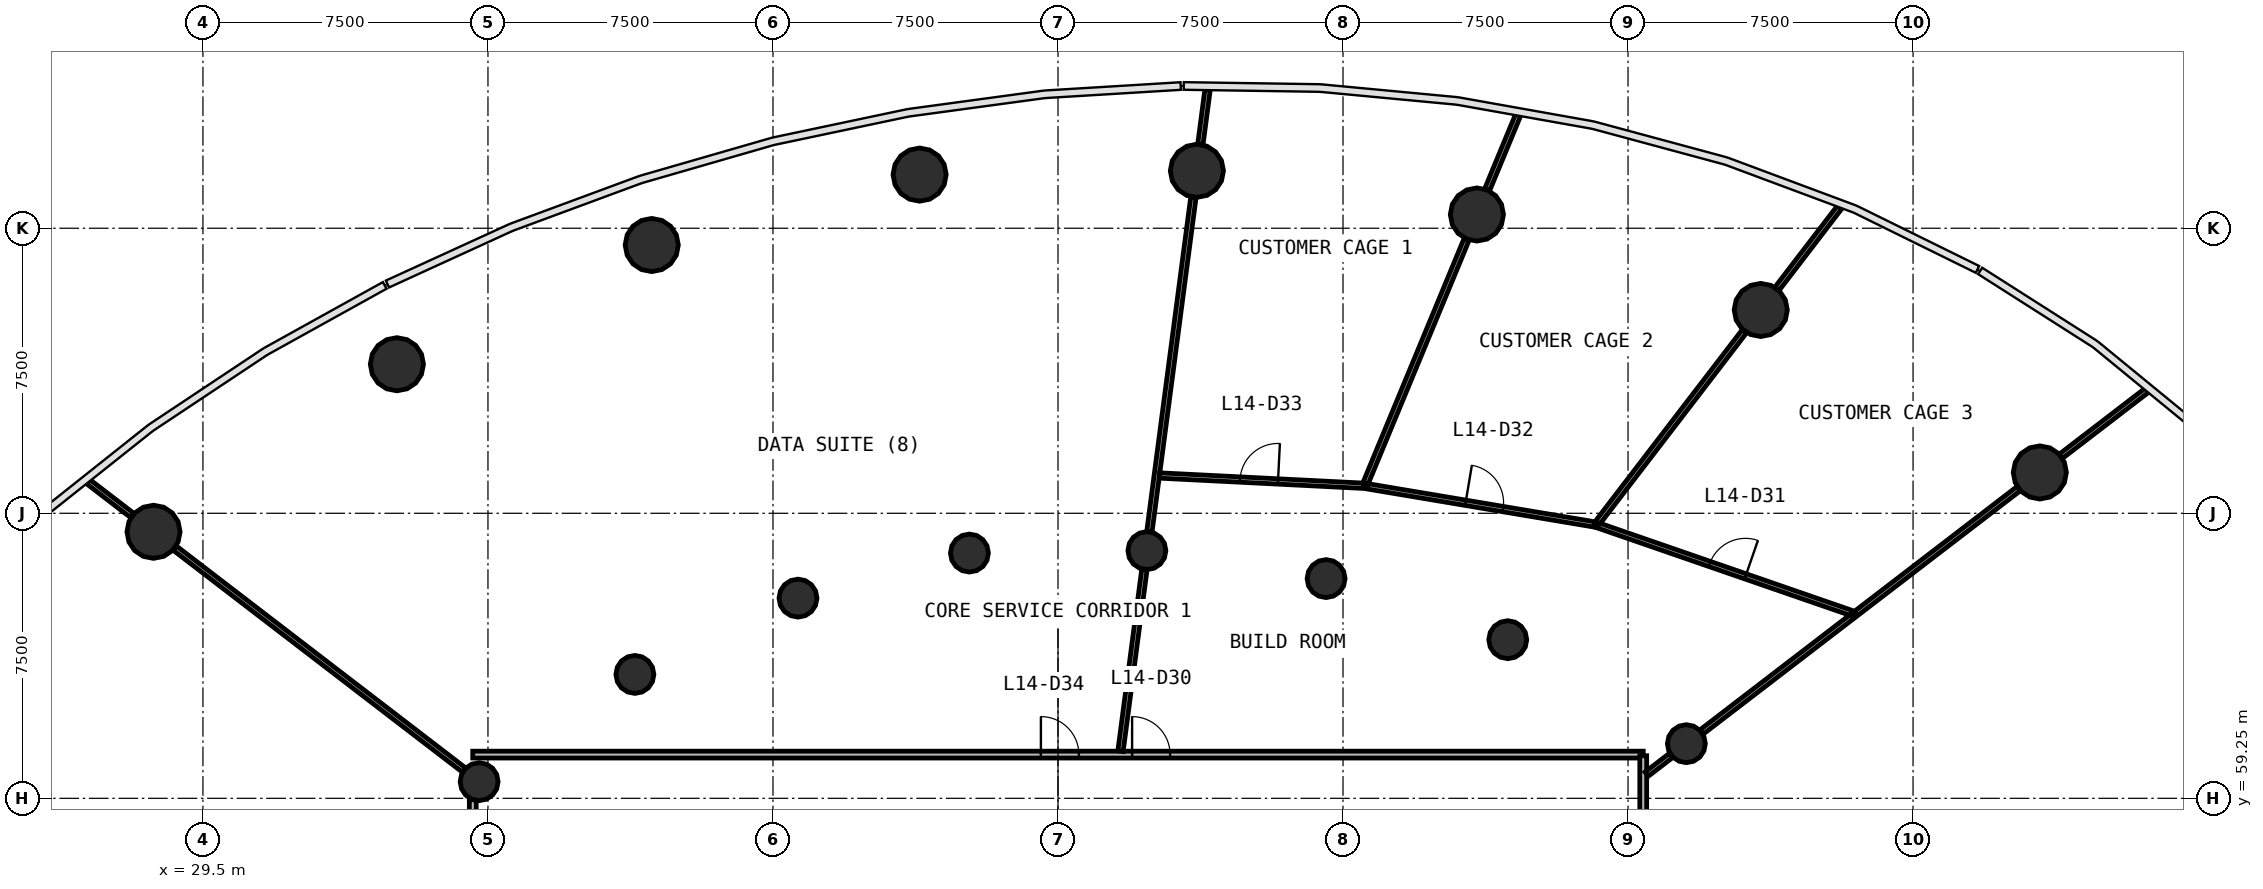
"""IFC4 building model, lengths in metres.
Left out: names, types, materials, properties, quantities, classifications, styles, units other than length and angle.
Written with IfcOpenShell. Run it as: python <this file> out.ifc"""

import sys

from ifc_helpers import new_model, si_unit, direction, frame, frame_2d, origin, origin_2d, place, context, subcontext, project, spatial, rectangle, circle, extrude, source, transform, mapped, element, fill, save


model = new_model("IFC4")
c1 = context("Model", 3, precision=1e-05, world=origin(), true_north=direction((0.0, 1.0)))
c2 = subcontext(c1, "Body", "Model", "MODEL_VIEW")
j1 = project(units=[si_unit("LENGTHUNIT", "METRE"), si_unit("PLANEANGLEUNIT", "RADIAN")], contexts=[c1])
p1 = place(None, origin())
s1 = spatial("IfcSite", under=j1, at=p1, CompositionType="ELEMENT")
p2 = place(p1, origin())
s2 = spatial("IfcBuilding", under=s1, at=p2, CompositionType="ELEMENT")
p3 = place(p2, frame((0.0, 0.0, 62.2)))
s3 = spatial("IfcBuildingStorey", under=s2, at=p3, CompositionType="ELEMENT", Elevation=62.2)
m1 = source(origin(), c2, "Body", "SweptSolid", [
    extrude(circle(Radius=0.7, at=origin_2d()), origin(), (0.0, 0.0, 1.0), 4.4),
])
for number, where, z_axis, x_axis in (
    (1, (77.836, 67.824, 0.0), (0.0, 0.0, 1.0), (1.0, 0.0, 0.0)),
    (2, (70.492, 72.1, 0.0), (0.0, 0.0, 1.0), (1.0, 0.0, 0.0)),
    (3, (63.023, 74.611, 0.0), (0.0, 0.0, 1.0), (1.0, 0.0, 0.0)),
    (4, (55.655, 75.761, 0.0), (0.0, 0.0, 1.0), (1.0, 0.0, 0.0)),
    (5, (48.358, 75.661, 0.0), (0.0, 0.0, 1.0), (1.0, 0.0, 0.0)),
    (6, (41.31, 73.809, 0.0), (0.0, 0.0, 1.0), (1.0, 0.0, 0.0)),
    (7, (34.604, 70.672, 0.0), (0.0, 0.0, 1.0), (1.0, 0.0, 0.0)),
    (8, (28.199, 66.263, 0.0), (0.0, 0.0, 1.0), (1.0, 0.0, 0.0)),
):
    element("IfcColumn", number, at=place(p3, frame(where, z_axis=z_axis, x_axis=x_axis)), inside=s3, PredefinedType="COLUMN", context=c2, shape_type="MappedRepresentation", body=[
        mapped(m1, transform((0.0, 0.0, 0.0), scale=1.0)),
    ])
m2 = source(origin(), c2, "Body", "SweptSolid", [
    extrude(circle(Radius=0.5, at=origin_2d()), origin(), (0.0, 0.0, 1.0), 4.4),
])
for number, where, z_axis, x_axis in (
    (9, (68.535, 60.688, 0.0), (0.0, 0.0, 1.0), (1.0, 0.0, 0.0)),
    (10, (63.835, 63.424, 0.0), (0.0, 0.0, 1.0), (1.0, 0.0, 0.0)),
    (11, (59.055, 65.031, 0.0), (0.0, 0.0, 1.0), (1.0, 0.0, 0.0)),
    (12, (54.339, 65.767, 0.0), (0.0, 0.0, 1.0), (1.0, 0.0, 0.0)),
    (13, (49.669, 65.703, 0.0), (0.0, 0.0, 1.0), (1.0, 0.0, 0.0)),
    (14, (45.158, 64.518, 0.0), (0.0, 0.0, 1.0), (1.0, 0.0, 0.0)),
    (15, (40.866, 62.51, 0.0), (0.0, 0.0, 1.0), (1.0, 0.0, 0.0)),
    (16, (36.768, 59.688, 0.0), (0.0, 0.0, 1.0), (1.0, 0.0, 0.0)),
):
    element("IfcColumn", number, at=place(p3, frame(where, z_axis=z_axis, x_axis=x_axis)), inside=s3, PredefinedType="COLUMN", context=c2, shape_type="MappedRepresentation", body=[
        mapped(m2, transform((0.0, 0.0, 0.0), scale=1.0)),
    ])
p4 = place(p3, frame((36.6, 60.4, 0.0), z_axis=(0.0, 0.0, 1.0), x_axis=(1.0, 0.0, 0.0)))
e17 = element("IfcWall", 17, at=p4, inside=s3, PredefinedType="PARTITIONING", context=c2, shape_type="SweptSolid", body=[
    extrude(rectangle(XDim=30.8, YDim=0.18, at=frame_2d((15.4, 0.0))), origin(), (0.0, 0.0, 1.0), 3.05),
])
p5 = place(p4, frame((17.35, 0.0, 0.0)))
e18 = element("IfcOpeningElement", 18, at=p5, cuts=e17, PredefinedType="OPENING", context=c2, shape_type="SweptSolid", body=[
    extrude(rectangle(XDim=1.0, YDim=2.1, at=frame_2d((0.5, 1.05))), frame((0.0, 0.1, 0.0), z_axis=(0.0, -1.0, 0.0), x_axis=(1.0, 0.0, 0.0)), (0.0, 0.0, 1.0), 0.2),
])
p6 = place(p4, frame((14.95, 0.0, 0.0)))
e19 = element("IfcOpeningElement", 19, at=p6, cuts=e17, PredefinedType="OPENING", context=c2, shape_type="SweptSolid", body=[
    extrude(rectangle(XDim=1.0, YDim=2.1, at=frame_2d((0.5, 1.05))), frame((0.0, 0.1, 0.0), z_axis=(0.0, -1.0, 0.0), x_axis=(1.0, 0.0, 0.0)), (0.0, 0.0, 1.0), 0.2),
])
p7 = place(p3, frame((67.4, 60.37, 0.0), z_axis=(0.0, 0.0, 1.0), x_axis=(0.0, -1.0, 0.0)))
e20 = element("IfcWall", 20, at=p7, inside=s3, PredefinedType="PARTITIONING", context=c2, shape_type="SweptSolid", body=[
    extrude(rectangle(XDim=23.583, YDim=0.18, at=frame_2d((11.791, 0.0))), origin(), (0.0, 0.0, 1.0), 3.05),
])
p8 = place(p7, frame((19.133, 0.0, 0.0)))
e21 = element("IfcOpeningElement", 21, at=p8, cuts=e20, PredefinedType="OPENING", context=c2, shape_type="SweptSolid", body=[
    extrude(rectangle(XDim=1.0, YDim=2.1, at=frame_2d((0.5, 1.05))), frame((0.0, 0.1, 0.0), z_axis=(0.0, -1.0, 0.0), x_axis=(1.0, 0.0, 0.0)), (0.0, 0.0, 1.0), 0.2),
])
p9 = place(p7, frame((11.333, 0.0, 0.0)))
e22 = element("IfcOpeningElement", 22, at=p9, cuts=e20, PredefinedType="OPENING", context=c2, shape_type="SweptSolid", body=[
    extrude(rectangle(XDim=1.0, YDim=2.1, at=frame_2d((0.5, 1.05))), frame((0.0, 0.1, 0.0), z_axis=(0.0, -1.0, 0.0), x_axis=(1.0, 0.0, 0.0)), (0.0, 0.0, 1.0), 0.2),
])
p10 = place(p3, frame((36.6, 35.63, 0.0), z_axis=(0.0, 0.0, 1.0), x_axis=(0.0, 1.0, 0.0)))
e23 = element("IfcWall", 23, at=p10, inside=s3, PredefinedType="PARTITIONING", context=c2, shape_type="SweptSolid", body=[
    extrude(rectangle(XDim=23.583, YDim=0.18, at=frame_2d((11.791, 0.0))), origin(), (0.0, 0.0, 1.0), 3.05),
])
p11 = place(p10, frame((14.732, 0.0, 0.0)))
e24 = element("IfcOpeningElement", 24, at=p11, cuts=e23, PredefinedType="OPENING", context=c2, shape_type="SweptSolid", body=[
    extrude(rectangle(XDim=1.0, YDim=2.1, at=frame_2d((0.5, 1.05))), frame((0.0, 0.1, 0.0), z_axis=(0.0, -1.0, 0.0), x_axis=(1.0, 0.0, 0.0)), (0.0, 0.0, 1.0), 0.2),
])
p12 = place(p10, frame((11.333, 0.0, 0.0)))
e25 = element("IfcOpeningElement", 25, at=p12, cuts=e23, PredefinedType="OPENING", context=c2, shape_type="SweptSolid", body=[
    extrude(rectangle(XDim=1.0, YDim=2.1, at=frame_2d((0.5, 1.05))), frame((0.0, 0.1, 0.0), z_axis=(0.0, -1.0, 0.0), x_axis=(1.0, 0.0, 0.0)), (0.0, 0.0, 1.0), 0.2),
])
p13 = place(p10, frame((9.133, 0.0, 0.0)))
e26 = element("IfcOpeningElement", 26, at=p13, cuts=e23, PredefinedType="OPENING", context=c2, shape_type="SweptSolid", body=[
    extrude(rectangle(XDim=1.0, YDim=2.1, at=frame_2d((0.5, 1.05))), frame((0.0, 0.1, 0.0), z_axis=(0.0, -1.0, 0.0), x_axis=(1.0, 0.0, 0.0)), (0.0, 0.0, 1.0), 0.2),
])
p14 = place(p3, frame((36.367, 59.995, 0.0), z_axis=(0.0, 0.0, 1.0), x_axis=(-0.793366218398, 0.608744645566, 0.0)))
e27 = element("IfcWall", 27, at=p14, inside=s3, PredefinedType="PARTITIONING", context=c2, shape_type="SweptSolid", body=[
    extrude(rectangle(XDim=9.591, YDim=0.14, at=frame_2d((4.796, 0.0))), origin(), (0.0, 0.0, 1.0), 3.05),
])
p15 = place(p3, frame((55.563, 75.063, 0.0), z_axis=(0.0, 0.0, 1.0), x_axis=(-0.130521426482, -0.991445488783, 0.0)))
e28 = element("IfcWall", 28, at=p15, inside=s3, PredefinedType="PARTITIONING", context=c2, shape_type="SweptSolid", body=[
    extrude(rectangle(XDim=8.872, YDim=0.14, at=frame_2d((4.436, 0.0))), origin(), (0.0, 0.0, 1.0), 3.05),
])
p16 = place(p3, frame((66.157, 66.45, 0.0), z_axis=(0.0, 0.0, 1.0), x_axis=(0.94512845443, -0.326698951064, 0.0)))
e29 = element("IfcWall", 29, at=p16, inside=s3, PredefinedType="PARTITIONING", context=c2, shape_type="SweptSolid", body=[
    extrude(rectangle(XDim=7.212, YDim=0.14, at=frame_2d((3.606, 0.0))), origin(), (0.0, 0.0, 1.0), 3.05),
])
p17 = place(p16, frame((3.162, 0.0, 0.0)))
e30 = element("IfcOpeningElement", 30, at=p17, cuts=e29, PredefinedType="OPENING", context=c2, shape_type="SweptSolid", body=[
    extrude(rectangle(XDim=1.0, YDim=2.1, at=frame_2d((0.5, 1.05))), frame((0.0, 0.08, 0.0), z_axis=(0.0, -1.0, 0.0), x_axis=(1.0, 0.0, 0.0)), (0.0, 0.0, 1.0), 0.16),
])
p18 = place(p3, frame((60.066, 67.473, 0.0), z_axis=(0.0, 0.0, 1.0), x_axis=(0.382656812721, 0.92389055828, 0.0)))
e31 = element("IfcWall", 31, at=p18, inside=s3, PredefinedType="PARTITIONING", context=c2, shape_type="SweptSolid", body=[
    extrude(rectangle(XDim=7.022, YDim=0.14, at=frame_2d((3.511, 0.0))), origin(), (0.0, 0.0, 1.0), 3.05),
])
p19 = place(p3, frame((66.202, 66.508, 0.0), z_axis=(0.0, 0.0, 1.0), x_axis=(0.608769216059, 0.793347365017, 0.0)))
e32 = element("IfcWall", 32, at=p19, inside=s3, PredefinedType="PARTITIONING", context=c2, shape_type="SweptSolid", body=[
    extrude(rectangle(XDim=6.344, YDim=0.14, at=frame_2d((3.172, 0.0))), origin(), (0.0, 0.0, 1.0), 3.05),
])
p20 = place(p3, frame((60.137, 67.461, 0.0), z_axis=(0.0, 0.0, 1.0), x_axis=(0.986188952804, -0.165624120731, 0.0)))
e33 = element("IfcWall", 33, at=p20, inside=s3, PredefinedType="PARTITIONING", context=c2, shape_type="SweptSolid", body=[
    extrude(rectangle(XDim=6.075, YDim=0.14, at=frame_2d((3.037, 0.0))), origin(), (0.0, 0.0, 1.0), 3.05),
])
p21 = place(p20, frame((2.625, 0.0, 0.0)))
e34 = element("IfcOpeningElement", 34, at=p21, cuts=e33, PredefinedType="OPENING", context=c2, shape_type="SweptSolid", body=[
    extrude(rectangle(XDim=1.0, YDim=2.1, at=frame_2d((0.5, 1.05))), frame((0.0, 0.08, 0.0), z_axis=(0.0, -1.0, 0.0), x_axis=(1.0, 0.0, 0.0)), (0.0, 0.0, 1.0), 0.16),
])
p22 = place(p3, frame((54.67, 67.744, 0.0), z_axis=(0.0, 0.0, 1.0), x_axis=(0.998734028084, -0.050302496432, 0.0)))
e35 = element("IfcWall", 35, at=p22, inside=s3, PredefinedType="PARTITIONING", context=c2, shape_type="SweptSolid", body=[
    extrude(rectangle(XDim=5.373, YDim=0.14, at=frame_2d((2.687, 0.0))), origin(), (0.0, 0.0, 1.0), 3.05),
])
p23 = place(p22, frame((2.123, 0.0, 0.0)))
e36 = element("IfcOpeningElement", 36, at=p23, cuts=e35, PredefinedType="OPENING", context=c2, shape_type="SweptSolid", body=[
    extrude(rectangle(XDim=1.0, YDim=2.1, at=frame_2d((0.5, 1.05))), frame((0.0, 0.08, 0.0), z_axis=(0.0, -1.0, 0.0), x_axis=(1.0, 0.0, 0.0)), (0.0, 0.0, 1.0), 0.16),
])
p24 = place(p3, frame((72.997, 64.112, 0.0), z_axis=(0.0, 0.0, 1.0), x_axis=(0.793363718192, 0.608747904027, 0.0)))
e37 = element("IfcWall", 37, at=p24, inside=s3, PredefinedType="PARTITIONING", context=c2, shape_type="SweptSolid", body=[
    extrude(rectangle(XDim=5.394, YDim=0.14, at=frame_2d((2.697, 0.0))), origin(), (0.0, 0.0, 1.0), 3.05),
])
p25 = place(p3, frame((68.935, 60.995, 0.0), z_axis=(0.0, 0.0, 1.0), x_axis=(0.793344926922, 0.608772393368, 0.0)))
e38 = element("IfcWall", 38, at=p25, inside=s3, PredefinedType="PARTITIONING", context=c2, shape_type="SweptSolid", body=[
    extrude(rectangle(XDim=5.007, YDim=0.14, at=frame_2d((2.503, 0.0))), origin(), (0.0, 0.0, 1.0), 3.05),
])
p26 = place(p3, frame((53.644, 60.49, 0.0), z_axis=(0.0, 0.0, 1.0), x_axis=(0.130523979823, 0.991445152639, 0.0)))
e39 = element("IfcWall", 39, at=p26, inside=s3, PredefinedType="PARTITIONING", context=c2, shape_type="SweptSolid", body=[
    extrude(rectangle(XDim=4.818, YDim=0.14, at=frame_2d((2.409, 0.0))), origin(), (0.0, 0.0, 1.0), 3.05),
])
p27 = place(p3, frame((78.394, 68.253, 0.0), z_axis=(0.0, 0.0, 1.0), x_axis=(0.793354252031, 0.608760240804, 0.0)))
e40 = element("IfcWall", 40, at=p27, inside=s3, PredefinedType="PARTITIONING", context=c2, shape_type="SweptSolid", body=[
    extrude(rectangle(XDim=2.869, YDim=0.14, at=frame_2d((1.434, 0.0))), origin(), (0.0, 0.0, 1.0), 3.05),
])
p28 = place(p3, frame((70.921, 72.658, 0.0), z_axis=(0.0, 0.0, 1.0), x_axis=(0.608759332692, 0.793354948847, 0.0)))
e41 = element("IfcWall", 41, at=p28, inside=s3, PredefinedType="PARTITIONING", context=c2, shape_type="SweptSolid", body=[
    extrude(rectangle(XDim=2.705, YDim=0.14, at=frame_2d((1.352, 0.0))), origin(), (0.0, 0.0, 1.0), 3.05),
])
p29 = place(p3, frame((63.292, 75.263, 0.0), z_axis=(0.0, 0.0, 1.0), x_axis=(0.382791800522, 0.923834637504, 0.0)))
e42 = element("IfcWall", 42, at=p29, inside=s3, PredefinedType="PARTITIONING", context=c2, shape_type="SweptSolid", body=[
    extrude(rectangle(XDim=2.14, YDim=0.14, at=frame_2d((1.07, 0.0))), origin(), (0.0, 0.0, 1.0), 3.05),
])
p30 = place(p3, frame((27.641, 66.691, 0.0), z_axis=(0.0, 0.0, 1.0), x_axis=(-0.793275855942, 0.608862395274, 0.0)))
e43 = element("IfcWall", 43, at=p30, inside=s3, PredefinedType="PARTITIONING", context=c2, shape_type="SweptSolid", body=[
    extrude(rectangle(XDim=1.475, YDim=0.14, at=frame_2d((0.737, 0.0))), origin(), (0.0, 0.0, 1.0), 3.05),
])
p31 = place(p3, frame((55.747, 76.46, 0.0), z_axis=(0.0, 0.0, 1.0), x_axis=(0.130550501092, 0.991441660747, 0.0)))
e44 = element("IfcWall", 44, at=p31, inside=s3, PredefinedType="PARTITIONING", context=c2, shape_type="SweptSolid", body=[
    extrude(rectangle(XDim=1.448, YDim=0.14, at=frame_2d((0.724, 0.0))), origin(), (0.0, 0.0, 1.0), 3.05),
])
p32 = place(p3, frame((67.49, 59.886, 0.0), z_axis=(0.0, 0.0, 1.0), x_axis=(0.793316076519, 0.608809989025, 0.0)))
e45 = element("IfcWall", 45, at=p32, inside=s3, PredefinedType="PARTITIONING", context=c2, shape_type="SweptSolid", body=[
    extrude(rectangle(XDim=0.812, YDim=0.14, at=frame_2d((0.406, 0.0))), origin(), (0.0, 0.0, 1.0), 3.05),
])
m3 = source(origin(), c2, "Body", "SweptSolid", [
    extrude(rectangle(XDim=1.0, YDim=2.1, at=frame_2d((0.5, 1.05))), frame((0.0, 0.025, 0.0), z_axis=(0.0, -1.0, 0.0), x_axis=(1.0, 0.0, 0.0)), (0.0, 0.0, 1.0), 0.05),
])
p33 = place(p5, origin())
e46 = element("IfcDoor", 46, at=p33, inside=s3, OperationType="SINGLE_SWING_LEFT", PredefinedType="DOOR", context=c2, shape_type="MappedRepresentation", body=[
    mapped(m3, transform((0.0, 0.0, 0.0), scale=1.0)),
])
fill(e18, e46)
p34 = place(p17, origin())
e47 = element("IfcDoor", 47, at=p34, inside=s3, OperationType="SINGLE_SWING_RIGHT", PredefinedType="DOOR", context=c2, shape_type="MappedRepresentation", body=[
    mapped(m3, transform((0.0, 0.0, 0.0), scale=1.0)),
])
fill(e30, e47)
p35 = place(p21, origin())
e48 = element("IfcDoor", 48, at=p35, inside=s3, OperationType="SINGLE_SWING_LEFT", PredefinedType="DOOR", context=c2, shape_type="MappedRepresentation", body=[
    mapped(m3, transform((0.0, 0.0, 0.0), scale=1.0)),
])
fill(e34, e48)
p36 = place(p23, origin())
e49 = element("IfcDoor", 49, at=p36, inside=s3, OperationType="SINGLE_SWING_RIGHT", PredefinedType="DOOR", context=c2, shape_type="MappedRepresentation", body=[
    mapped(m3, transform((0.0, 0.0, 0.0), scale=1.0)),
])
fill(e36, e49)
p37 = place(p6, origin())
e50 = element("IfcDoor", 50, at=p37, inside=s3, OperationType="SINGLE_SWING_LEFT", PredefinedType="DOOR", context=c2, shape_type="MappedRepresentation", body=[
    mapped(m3, transform((0.0, 0.0, 0.0), scale=1.0)),
])
fill(e19, e50)
save(model, sys.argv[1])
